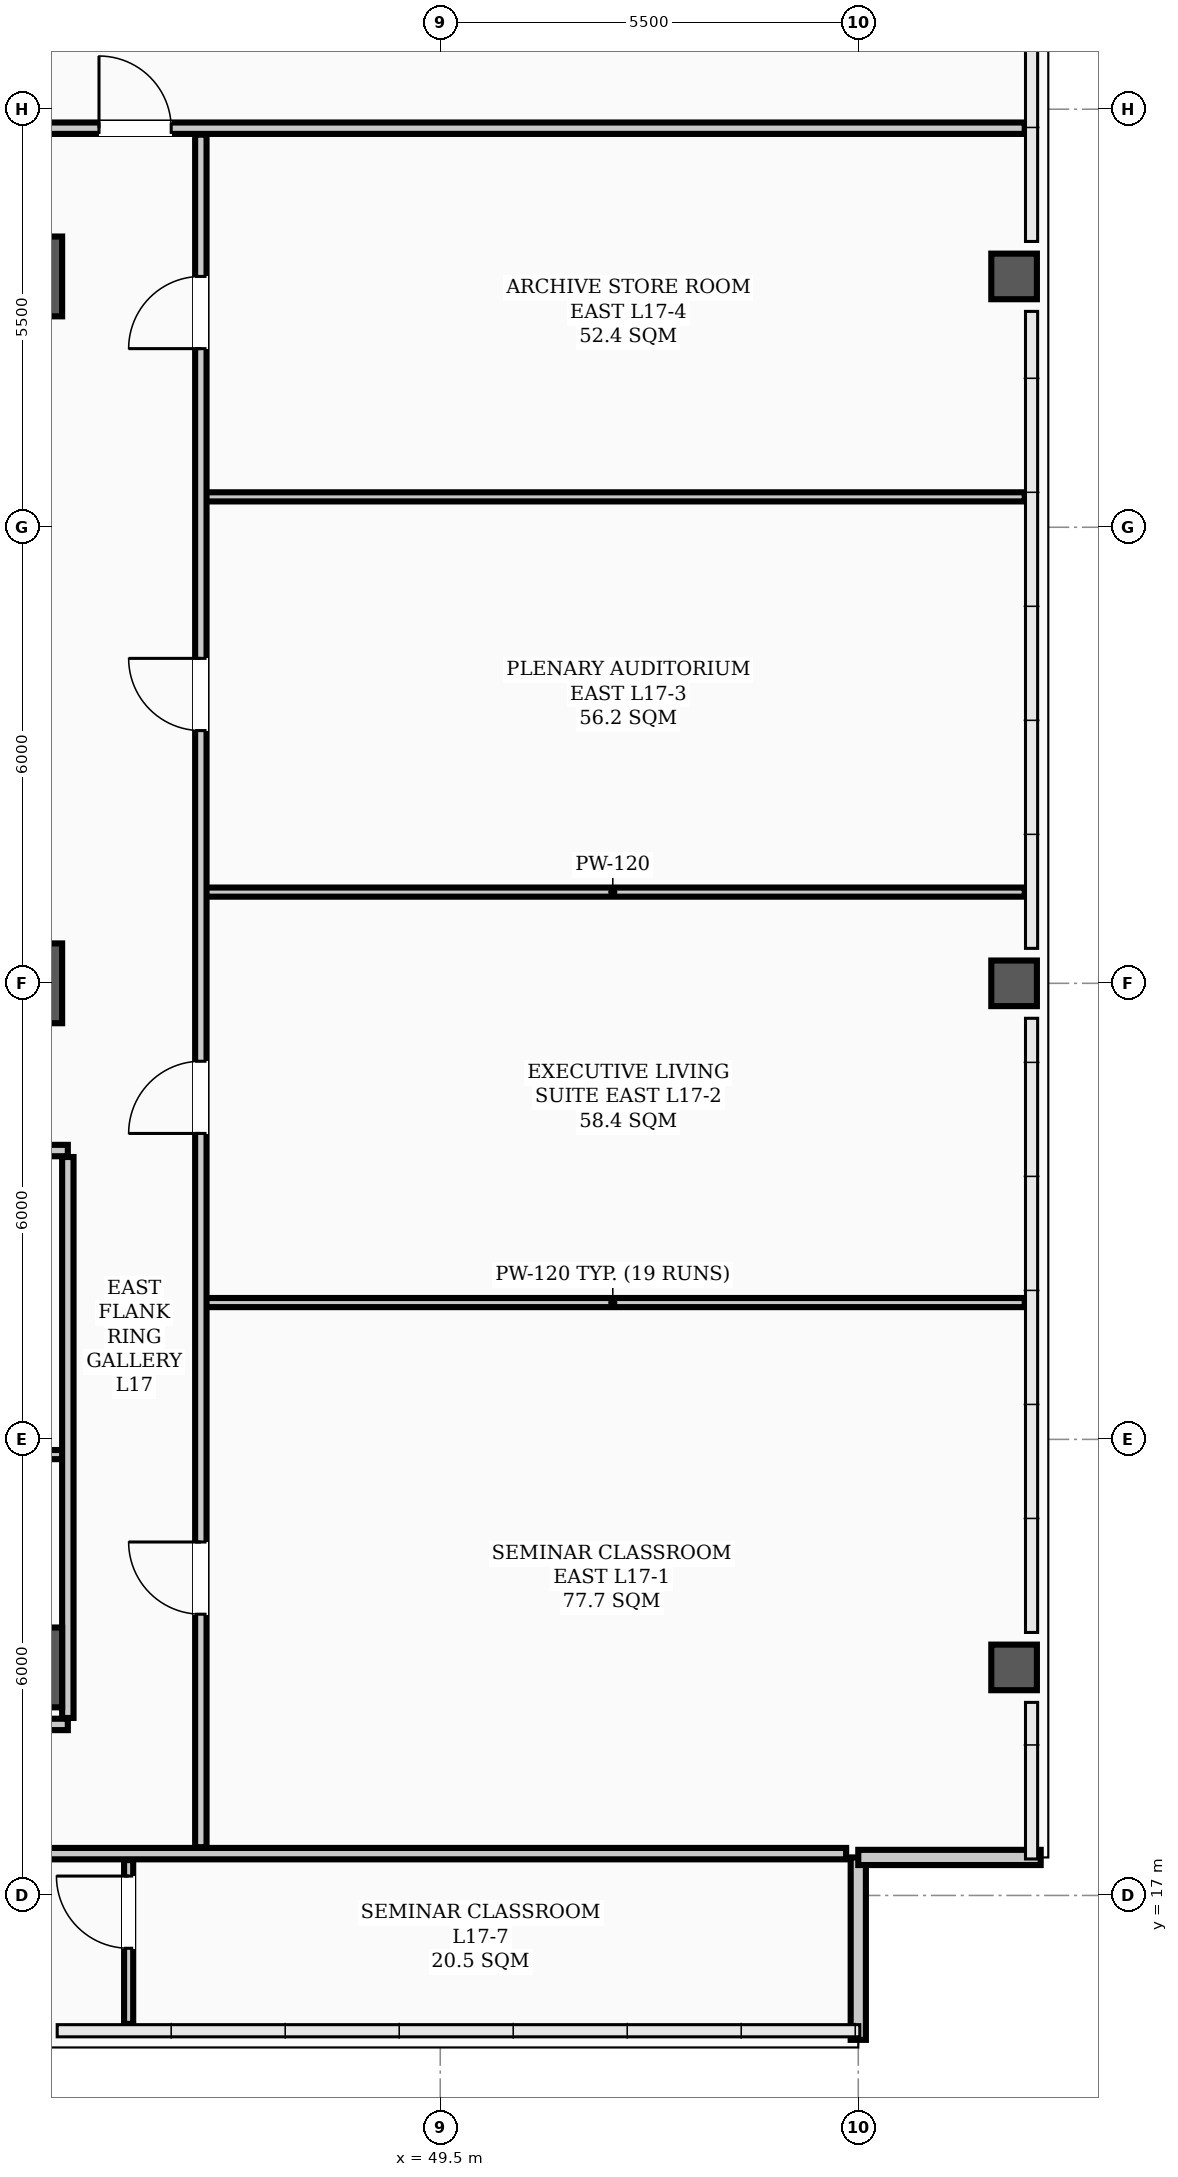
"""IFC4 building model, lengths in metres.
Left out: names, types, materials, properties, quantities, classifications, styles, units other than length and angle.
Written with IfcOpenShell. Run it as: python <this file> out.ifc"""

import sys

from ifc_helpers import new_model, si_unit, direction, frame, frame_2d, origin, origin_2d, place, context, subcontext, project, spatial, rectangle, hollow_rectangle, extrude, element, fill, save


model = new_model("IFC4")
c1 = context("Model", 3, precision=1e-05, world=origin(), true_north=direction((0.0, 1.0)))
c2 = subcontext(c1, "Body", "Model", "MODEL_VIEW")
j1 = project(units=[si_unit("LENGTHUNIT", "METRE"), si_unit("PLANEANGLEUNIT", "RADIAN")], contexts=[c1])
p1 = place(None, origin())
s1 = spatial("IfcSite", under=j1, at=p1, CompositionType="ELEMENT")
p2 = place(p1, origin())
s2 = spatial("IfcBuilding", under=s1, at=p2, CompositionType="ELEMENT")
p3 = place(p2, frame((0.0, 0.0, 69.4)))
s3 = spatial("IfcBuildingStorey", under=s2, at=p3, CompositionType="ELEMENT", Elevation=69.4)
for number, where, z_axis, x_axis in (
    (1, (44.0, 29.0, 0.0), (0.0, 0.0, 1.0), (1.0, 0.0, 0.0)),
    (2, (44.0, 38.3, 0.0), (0.0, 0.0, 1.0), (1.0, 0.0, 0.0)),
    (3, (44.0, 20.0, 0.0), (0.0, 0.0, 1.0), (1.0, 0.0, 0.0)),
):
    element("IfcColumn", number, at=place(p3, frame(where, z_axis=z_axis, x_axis=x_axis)), inside=s3, PredefinedType="COLUMN", context=c2, shape_type="SweptSolid", body=[
        extrude(hollow_rectangle(XDim=1.05, YDim=1.05, WallThickness=0.038, InnerFilletRadius=0.019, OuterFilletRadius=0.057, at=origin_2d()), origin(), (0.0, 0.0, 1.0), 3.9),
    ])
for number, where, z_axis, x_axis in (
    (4, (57.05, 20.0, 0.0), (0.0, 0.0, 1.0), (1.0, 0.0, 0.0)),
    (5, (57.05, 29.0, 0.0), (0.0, 0.0, 1.0), (1.0, 0.0, 0.0)),
    (6, (57.05, 38.3, 0.0), (0.0, 0.0, 1.0), (1.0, 0.0, 0.0)),
):
    element("IfcColumn", number, at=place(p3, frame(where, z_axis=z_axis, x_axis=x_axis)), inside=s3, PredefinedType="COLUMN", context=c2, shape_type="SweptSolid", body=[
        extrude(hollow_rectangle(XDim=0.6, YDim=0.6, WallThickness=0.026, InnerFilletRadius=0.013, OuterFilletRadius=0.039, at=origin_2d()), origin(), (0.0, 0.0, 1.0), 3.9),
    ])
for number, where, z_axis, x_axis in (
    (7, (55.0, 15.1, 0.0), (0.0, 0.0, 1.0), (0.0, 1.0, 0.0)),
    (8, (55.0, 17.5, 0.0), (0.0, 0.0, 1.0), (1.0, 0.0, 0.0)),
):
    element("IfcWall", number, at=place(p3, frame(where, z_axis=z_axis, x_axis=x_axis)), inside=s3, PredefinedType="PARAPET", context=c2, shape_type="SweptSolid", body=[
        extrude(rectangle(XDim=2.4, YDim=0.2, at=frame_2d((1.2, 0.0))), origin(), (0.0, 0.0, 1.0), 1.2),
    ])
p4 = place(p3, frame((12.9, 26.8, 0.0), z_axis=(0.0, 0.0, 1.0), x_axis=(1.0, 0.0, 0.0)))
e9 = element("IfcWall", 9, at=p4, inside=s3, PredefinedType="PARTITIONING", context=c2, shape_type="SweptSolid", body=[
    extrude(rectangle(XDim=31.7, YDim=0.15, at=frame_2d((15.85, 0.0))), origin(), (0.0, 0.0, 1.0), 3.1),
])
p5 = place(p4, frame((13.6, 0.0, 0.0)))
e10 = element("IfcOpeningElement", 10, at=p5, cuts=e9, PredefinedType="OPENING", context=c2, shape_type="SweptSolid", body=[
    extrude(rectangle(XDim=1.6, YDim=2.08, at=frame_2d((0.8, 1.04))), frame((0.0, 0.085, 0.0), z_axis=(0.0, -1.0, 0.0), x_axis=(1.0, 0.0, 0.0)), (0.0, 0.0, 1.0), 0.17),
])
p6 = place(p4, frame((2.475, 0.0, 0.0)))
e11 = element("IfcOpeningElement", 11, at=p6, cuts=e9, PredefinedType="OPENING", context=c2, shape_type="SweptSolid", body=[
    extrude(rectangle(XDim=0.95, YDim=2.08, at=frame_2d((0.475, 1.04))), frame((0.0, 0.085, 0.0), z_axis=(0.0, -1.0, 0.0), x_axis=(1.0, 0.0, 0.0)), (0.0, 0.0, 1.0), 0.17),
])
p7 = place(p4, frame((9.125, 0.0, 0.0)))
e12 = element("IfcOpeningElement", 12, at=p7, cuts=e9, PredefinedType="OPENING", context=c2, shape_type="SweptSolid", body=[
    extrude(rectangle(XDim=0.95, YDim=2.08, at=frame_2d((0.475, 1.04))), frame((0.0, 0.085, 0.0), z_axis=(0.0, -1.0, 0.0), x_axis=(1.0, 0.0, 0.0)), (0.0, 0.0, 1.0), 0.17),
])
p8 = place(p4, frame((19.125, 0.0, 0.0)))
e13 = element("IfcOpeningElement", 13, at=p8, cuts=e9, PredefinedType="OPENING", context=c2, shape_type="SweptSolid", body=[
    extrude(rectangle(XDim=0.95, YDim=2.08, at=frame_2d((0.475, 1.04))), frame((0.0, 0.085, 0.0), z_axis=(0.0, -1.0, 0.0), x_axis=(1.0, 0.0, 0.0)), (0.0, 0.0, 1.0), 0.17),
])
p9 = place(p4, frame((26.325, 0.0, 0.0)))
e14 = element("IfcOpeningElement", 14, at=p9, cuts=e9, PredefinedType="OPENING", context=c2, shape_type="SweptSolid", body=[
    extrude(rectangle(XDim=0.95, YDim=2.08, at=frame_2d((0.475, 1.04))), frame((0.0, 0.085, 0.0), z_axis=(0.0, -1.0, 0.0), x_axis=(1.0, 0.0, 0.0)), (0.0, 0.0, 1.0), 0.17),
])
p10 = place(p3, frame((10.16, 17.55, 0.0), z_axis=(0.0, 0.0, 1.0), x_axis=(1.0, 0.0, 0.0)))
e15 = element("IfcWall", 15, at=p10, inside=s3, PredefinedType="PARTITIONING", context=c2, shape_type="SweptSolid", body=[
    extrude(rectangle(XDim=44.68, YDim=0.15, at=frame_2d((22.34, 0.0))), origin(), (0.0, 0.0, 1.0), 3.1),
])
p11 = place(p10, frame((2.04, 0.0, 0.0)))
e16 = element("IfcOpeningElement", 16, at=p11, cuts=e15, PredefinedType="OPENING", context=c2, shape_type="SweptSolid", body=[
    extrude(rectangle(XDim=0.95, YDim=2.08, at=frame_2d((0.475, 1.04))), frame((0.0, 0.085, 0.0), z_axis=(0.0, -1.0, 0.0), x_axis=(1.0, 0.0, 0.0)), (0.0, 0.0, 1.0), 0.17),
])
p12 = place(p10, frame((6.565, 0.0, 0.0)))
e17 = element("IfcOpeningElement", 17, at=p12, cuts=e15, PredefinedType="OPENING", context=c2, shape_type="SweptSolid", body=[
    extrude(rectangle(XDim=0.95, YDim=2.08, at=frame_2d((0.475, 1.04))), frame((0.0, 0.085, 0.0), z_axis=(0.0, -1.0, 0.0), x_axis=(1.0, 0.0, 0.0)), (0.0, 0.0, 1.0), 0.17),
])
p13 = place(p10, frame((11.865, 0.0, 0.0)))
e18 = element("IfcOpeningElement", 18, at=p13, cuts=e15, PredefinedType="OPENING", context=c2, shape_type="SweptSolid", body=[
    extrude(rectangle(XDim=0.95, YDim=2.08, at=frame_2d((0.475, 1.04))), frame((0.0, 0.085, 0.0), z_axis=(0.0, -1.0, 0.0), x_axis=(1.0, 0.0, 0.0)), (0.0, 0.0, 1.0), 0.17),
])
p14 = place(p10, frame((24.665, 0.0, 0.0)))
e19 = element("IfcOpeningElement", 19, at=p14, cuts=e15, PredefinedType="OPENING", context=c2, shape_type="SweptSolid", body=[
    extrude(rectangle(XDim=0.95, YDim=2.08, at=frame_2d((0.475, 1.04))), frame((0.0, 0.085, 0.0), z_axis=(0.0, -1.0, 0.0), x_axis=(1.0, 0.0, 0.0)), (0.0, 0.0, 1.0), 0.17),
])
p15 = place(p10, frame((31.765, 0.0, 0.0)))
e20 = element("IfcOpeningElement", 20, at=p15, cuts=e15, PredefinedType="OPENING", context=c2, shape_type="SweptSolid", body=[
    extrude(rectangle(XDim=0.95, YDim=2.08, at=frame_2d((0.475, 1.04))), frame((0.0, 0.085, 0.0), z_axis=(0.0, -1.0, 0.0), x_axis=(1.0, 0.0, 0.0)), (0.0, 0.0, 1.0), 0.17),
])
p16 = place(p3, frame((28.4, 19.25, 0.0), z_axis=(0.0, 0.0, 1.0), x_axis=(1.0, 0.0, 0.0)))
e21 = element("IfcWall", 21, at=p16, inside=s3, PredefinedType="PARTITIONING", context=c2, shape_type="SweptSolid", body=[
    extrude(rectangle(XDim=16.2, YDim=0.15, at=frame_2d((8.1, 0.0))), origin(), (0.0, 0.0, 1.0), 3.1),
])
p17 = place(p16, frame((3.625, 0.0, 0.0)))
e22 = element("IfcOpeningElement", 22, at=p17, cuts=e21, PredefinedType="OPENING", context=c2, shape_type="SweptSolid", body=[
    extrude(rectangle(XDim=0.95, YDim=2.08, at=frame_2d((0.475, 1.04))), frame((0.0, 0.085, 0.0), z_axis=(0.0, -1.0, 0.0), x_axis=(1.0, 0.0, 0.0)), (0.0, 0.0, 1.0), 0.17),
])
p18 = place(p16, frame((10.825, 0.0, 0.0)))
e23 = element("IfcOpeningElement", 23, at=p18, cuts=e21, PredefinedType="OPENING", context=c2, shape_type="SweptSolid", body=[
    extrude(rectangle(XDim=0.95, YDim=2.08, at=frame_2d((0.475, 1.04))), frame((0.0, 0.085, 0.0), z_axis=(0.0, -1.0, 0.0), x_axis=(1.0, 0.0, 0.0)), (0.0, 0.0, 1.0), 0.17),
])
p19 = place(p3, frame((34.8, 22.8, 0.0), z_axis=(0.0, 0.0, 1.0), x_axis=(1.0, 0.0, 0.0)))
e24 = element("IfcWall", 24, at=p19, inside=s3, PredefinedType="PARTITIONING", context=c2, shape_type="SweptSolid", body=[
    extrude(rectangle(XDim=9.8, YDim=0.12, at=frame_2d((4.9, 0.0))), origin(), (0.0, 0.0, 1.0), 3.1),
])
for number, where, z_axis, x_axis in (
    (25, (46.35, 24.8, 0.0), (0.0, 0.0, 1.0), (1.0, 0.0, 0.0)),
    (26, (46.35, 30.2, 0.0), (0.0, 0.0, 1.0), (1.0, 0.0, 0.0)),
    (27, (46.35, 35.4, 0.0), (0.0, 0.0, 1.0), (1.0, 0.0, 0.0)),
):
    element("IfcWall", number, at=place(p3, frame(where, z_axis=z_axis, x_axis=x_axis)), inside=s3, PredefinedType="PARTITIONING", context=c2, shape_type="SweptSolid", body=[
        extrude(rectangle(XDim=10.84, YDim=0.12, at=frame_2d((5.42, 0.0))), origin(), (0.0, 0.0, 1.0), 3.212),
    ])
p20 = place(p3, frame((7.81, 40.25, 0.0), z_axis=(0.0, 0.0, 1.0), x_axis=(1.0, 0.0, 0.0)))
e28 = element("IfcWall", 28, at=p20, inside=s3, PredefinedType="PARTITIONING", context=c2, shape_type="SweptSolid", body=[
    extrude(rectangle(XDim=49.38, YDim=0.15, at=frame_2d((24.69, 0.0))), origin(), (0.0, 0.0, 1.0), 3.1),
])
p21 = place(p20, frame((3.73, 0.0, 0.0)))
e29 = element("IfcOpeningElement", 29, at=p21, cuts=e28, PredefinedType="OPENING", context=c2, shape_type="SweptSolid", body=[
    extrude(rectangle(XDim=0.95, YDim=2.08, at=frame_2d((0.475, 1.04))), frame((0.0, 0.085, 0.0), z_axis=(0.0, -1.0, 0.0), x_axis=(1.0, 0.0, 0.0)), (0.0, 0.0, 1.0), 0.17),
])
p22 = place(p20, frame((11.015, 0.0, 0.0)))
e30 = element("IfcOpeningElement", 30, at=p22, cuts=e28, PredefinedType="OPENING", context=c2, shape_type="SweptSolid", body=[
    extrude(rectangle(XDim=0.95, YDim=2.08, at=frame_2d((0.475, 1.04))), frame((0.0, 0.085, 0.0), z_axis=(0.0, -1.0, 0.0), x_axis=(1.0, 0.0, 0.0)), (0.0, 0.0, 1.0), 0.17),
])
p23 = place(p20, frame((18.215, 0.0, 0.0)))
e31 = element("IfcOpeningElement", 31, at=p23, cuts=e28, PredefinedType="OPENING", context=c2, shape_type="SweptSolid", body=[
    extrude(rectangle(XDim=0.95, YDim=2.08, at=frame_2d((0.475, 1.04))), frame((0.0, 0.085, 0.0), z_axis=(0.0, -1.0, 0.0), x_axis=(1.0, 0.0, 0.0)), (0.0, 0.0, 1.0), 0.17),
])
p24 = place(p20, frame((25.515, 0.0, 0.0)))
e32 = element("IfcOpeningElement", 32, at=p24, cuts=e28, PredefinedType="OPENING", context=c2, shape_type="SweptSolid", body=[
    extrude(rectangle(XDim=0.95, YDim=2.08, at=frame_2d((0.475, 1.04))), frame((0.0, 0.085, 0.0), z_axis=(0.0, -1.0, 0.0), x_axis=(1.0, 0.0, 0.0)), (0.0, 0.0, 1.0), 0.17),
])
p25 = place(p20, frame((31.915, 0.0, 0.0)))
e33 = element("IfcOpeningElement", 33, at=p25, cuts=e28, PredefinedType="OPENING", context=c2, shape_type="SweptSolid", body=[
    extrude(rectangle(XDim=0.95, YDim=2.08, at=frame_2d((0.475, 1.04))), frame((0.0, 0.085, 0.0), z_axis=(0.0, -1.0, 0.0), x_axis=(1.0, 0.0, 0.0)), (0.0, 0.0, 1.0), 0.17),
])
p26 = place(p20, frame((37.2, 0.0, 0.0)))
e34 = element("IfcOpeningElement", 34, at=p26, cuts=e28, PredefinedType="OPENING", context=c2, shape_type="SweptSolid", body=[
    extrude(rectangle(XDim=0.95, YDim=2.08, at=frame_2d((0.475, 1.04))), frame((0.0, 0.085, 0.0), z_axis=(0.0, -1.0, 0.0), x_axis=(1.0, 0.0, 0.0)), (0.0, 0.0, 1.0), 0.17),
])
p27 = place(p3, frame((46.35, 17.635, 0.0), z_axis=(0.0, 0.0, 1.0), x_axis=(0.0, 1.0, 0.0)))
e35 = element("IfcWall", 35, at=p27, inside=s3, PredefinedType="PARTITIONING", context=c2, shape_type="SweptSolid", body=[
    extrude(rectangle(XDim=22.53, YDim=0.15, at=frame_2d((11.265, 0.0))), origin(), (0.0, 0.0, 1.0), 3.0),
])
p28 = place(p27, frame((3.065, 0.0, 0.0)))
e36 = element("IfcOpeningElement", 36, at=p28, cuts=e35, PredefinedType="OPENING", context=c2, shape_type="SweptSolid", body=[
    extrude(rectangle(XDim=0.95, YDim=2.08, at=frame_2d((0.475, 1.04))), frame((0.0, 0.085, 0.0), z_axis=(0.0, -1.0, 0.0), x_axis=(1.0, 0.0, 0.0)), (0.0, 0.0, 1.0), 0.17),
])
p29 = place(p27, frame((9.39, 0.0, 0.0)))
e37 = element("IfcOpeningElement", 37, at=p29, cuts=e35, PredefinedType="OPENING", context=c2, shape_type="SweptSolid", body=[
    extrude(rectangle(XDim=0.95, YDim=2.08, at=frame_2d((0.475, 1.04))), frame((0.0, 0.085, 0.0), z_axis=(0.0, -1.0, 0.0), x_axis=(1.0, 0.0, 0.0)), (0.0, 0.0, 1.0), 0.17),
])
p30 = place(p27, frame((14.69, 0.0, 0.0)))
e38 = element("IfcOpeningElement", 38, at=p30, cuts=e35, PredefinedType="OPENING", context=c2, shape_type="SweptSolid", body=[
    extrude(rectangle(XDim=0.95, YDim=2.08, at=frame_2d((0.475, 1.04))), frame((0.0, 0.085, 0.0), z_axis=(0.0, -1.0, 0.0), x_axis=(1.0, 0.0, 0.0)), (0.0, 0.0, 1.0), 0.17),
])
p31 = place(p27, frame((19.715, 0.0, 0.0)))
e39 = element("IfcOpeningElement", 39, at=p31, cuts=e35, PredefinedType="OPENING", context=c2, shape_type="SweptSolid", body=[
    extrude(rectangle(XDim=0.95, YDim=2.08, at=frame_2d((0.475, 1.04))), frame((0.0, 0.085, 0.0), z_axis=(0.0, -1.0, 0.0), x_axis=(1.0, 0.0, 0.0)), (0.0, 0.0, 1.0), 0.17),
])
p32 = place(p3, frame((44.6, 19.335, 0.0), z_axis=(0.0, 0.0, 1.0), x_axis=(0.0, 1.0, 0.0)))
e40 = element("IfcWall", 40, at=p32, inside=s3, PredefinedType="PARTITIONING", context=c2, shape_type="SweptSolid", body=[
    extrude(rectangle(XDim=7.38, YDim=0.15, at=frame_2d((3.69, 0.0))), origin(), (0.0, 0.0, 1.0), 3.0),
])
p33 = place(p3, frame((45.4, 15.31, 0.0), z_axis=(0.0, 0.0, 1.0), x_axis=(0.0, 1.0, 0.0)))
e41 = element("IfcWall", 41, at=p33, inside=s3, PredefinedType="PARTITIONING", context=c2, shape_type="SweptSolid", body=[
    extrude(rectangle(XDim=2.155, YDim=0.12, at=frame_2d((1.078, 0.0))), origin(), (0.0, 0.0, 1.0), 3.72),
])
p34 = place(p33, frame((0.995, 0.0, 0.0)))
e42 = element("IfcOpeningElement", 42, at=p34, cuts=e41, PredefinedType="OPENING", context=c2, shape_type="SweptSolid", body=[
    extrude(rectangle(XDim=0.95, YDim=2.08, at=frame_2d((0.475, 1.04))), frame((0.0, 0.07, 0.0), z_axis=(0.0, -1.0, 0.0), x_axis=(1.0, 0.0, 0.0)), (0.0, 0.0, 1.0), 0.14),
])
p35 = place(p34, origin())
e43 = element("IfcDoor", 43, at=p35, inside=s3, OperationType="SINGLE_SWING_RIGHT", PredefinedType="DOOR", context=c2, shape_type="SweptSolid", body=[
    extrude(rectangle(XDim=0.95, YDim=2.08, at=frame_2d((0.475, 1.04))), frame((0.0, 0.025, 0.0), z_axis=(0.0, -1.0, 0.0), x_axis=(1.0, 0.0, 0.0)), (0.0, 0.0, 1.0), 0.05),
])
fill(e42, e43)
p36 = place(p28, origin())
e44 = element("IfcDoor", 44, at=p36, inside=s3, OperationType="SINGLE_SWING_RIGHT", PredefinedType="DOOR", context=c2, shape_type="SweptSolid", body=[
    extrude(rectangle(XDim=0.95, YDim=2.08, at=frame_2d((0.475, 1.04))), frame((0.0, 0.025, 0.0), z_axis=(0.0, -1.0, 0.0), x_axis=(1.0, 0.0, 0.0)), (0.0, 0.0, 1.0), 0.05),
])
fill(e36, e44)
p37 = place(p29, origin())
e45 = element("IfcDoor", 45, at=p37, inside=s3, OperationType="SINGLE_SWING_LEFT", PredefinedType="DOOR", context=c2, shape_type="SweptSolid", body=[
    extrude(rectangle(XDim=0.95, YDim=2.08, at=frame_2d((0.475, 1.04))), frame((0.0, 0.025, 0.0), z_axis=(0.0, -1.0, 0.0), x_axis=(1.0, 0.0, 0.0)), (0.0, 0.0, 1.0), 0.05),
])
fill(e37, e45)
p38 = place(p30, origin())
e46 = element("IfcDoor", 46, at=p38, inside=s3, OperationType="SINGLE_SWING_RIGHT", PredefinedType="DOOR", context=c2, shape_type="SweptSolid", body=[
    extrude(rectangle(XDim=0.95, YDim=2.08, at=frame_2d((0.475, 1.04))), frame((0.0, 0.025, 0.0), z_axis=(0.0, -1.0, 0.0), x_axis=(1.0, 0.0, 0.0)), (0.0, 0.0, 1.0), 0.05),
])
fill(e38, e46)
p39 = place(p31, origin())
e47 = element("IfcDoor", 47, at=p39, inside=s3, OperationType="SINGLE_SWING_LEFT", PredefinedType="DOOR", context=c2, shape_type="SweptSolid", body=[
    extrude(rectangle(XDim=0.95, YDim=2.08, at=frame_2d((0.475, 1.04))), frame((0.0, 0.025, 0.0), z_axis=(0.0, -1.0, 0.0), x_axis=(1.0, 0.0, 0.0)), (0.0, 0.0, 1.0), 0.05),
])
fill(e39, e47)
p40 = place(p26, origin())
e48 = element("IfcDoor", 48, at=p40, inside=s3, OperationType="SINGLE_SWING_LEFT", PredefinedType="DOOR", context=c2, shape_type="SweptSolid", body=[
    extrude(rectangle(XDim=0.95, YDim=2.08, at=frame_2d((0.475, 1.04))), frame((0.0, 0.025, 0.0), z_axis=(0.0, -1.0, 0.0), x_axis=(1.0, 0.0, 0.0)), (0.0, 0.0, 1.0), 0.05),
])
fill(e34, e48)
save(model, sys.argv[1])
